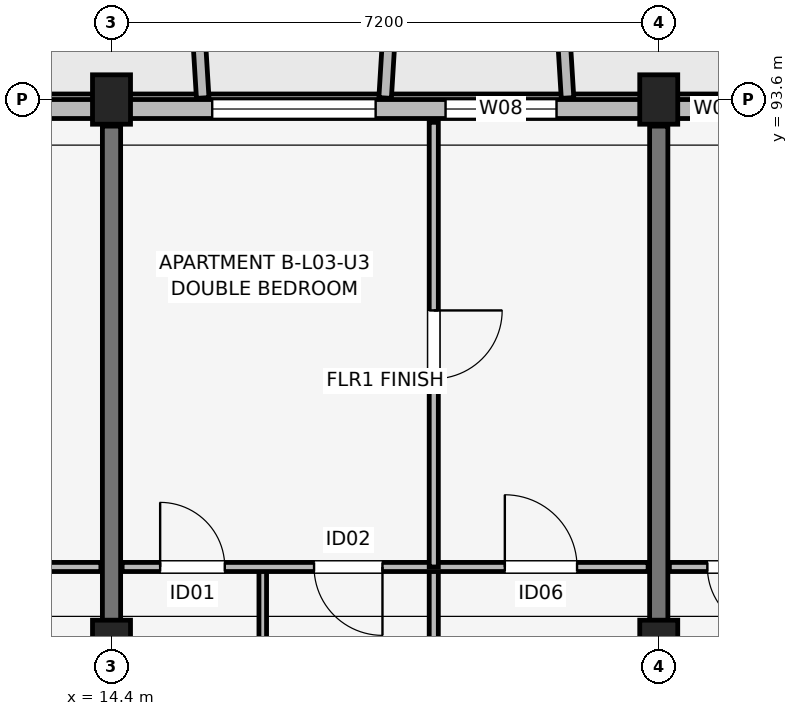
"""IFC4 building model, lengths in metres.
Left out: names, types, materials, properties, quantities, classifications, styles, units other than length and angle.
Written with IfcOpenShell. Run it as: python <this file> out.ifc"""

import sys

from ifc_helpers import new_model, si_unit, direction, frame, frame_2d, origin, origin_2d, place, context, subcontext, project, spatial, rectangle, extrude, element, fill, save


model = new_model("IFC4")
c1 = context("Model", 3, precision=1e-05, world=origin(), true_north=direction((0.0, 1.0)))
c2 = subcontext(c1, "Body", "Model", "MODEL_VIEW")
j1 = project(units=[si_unit("LENGTHUNIT", "METRE"), si_unit("PLANEANGLEUNIT", "RADIAN")], contexts=[c1])
p1 = place(None, origin())
s1 = spatial("IfcSite", under=j1, at=p1, CompositionType="ELEMENT")
p2 = place(p1, origin())
s2 = spatial("IfcBuilding", under=s1, at=p2, CompositionType="ELEMENT")
p3 = place(p2, frame((0.0, 0.0, 11.85)))
s3 = spatial("IfcBuildingStorey", under=s2, at=p3, CompositionType="ELEMENT", Elevation=11.85)
p4 = place(p3, frame((14.4, 86.4, 0.0), z_axis=(0.0, 0.0, 1.0), x_axis=(1.0, 0.0, 0.0)))
e1 = element("IfcColumn", 1, at=p4, inside=s3, PredefinedType="COLUMN", context=c2, shape_type="SweptSolid", body=[
    extrude(rectangle(XDim=0.5, YDim=0.7, at=origin_2d()), origin(), (0.0, 0.0, 1.0), 3.15),
])
p5 = place(p3, frame((14.4, 93.6, 0.0), z_axis=(0.0, 0.0, 1.0), x_axis=(1.0, 0.0, 0.0)))
e2 = element("IfcColumn", 2, at=p5, inside=s3, PredefinedType="COLUMN", context=c2, shape_type="SweptSolid", body=[
    extrude(rectangle(XDim=0.5, YDim=0.65, at=origin_2d()), origin(), (0.0, 0.0, 1.0), 3.15),
])
p6 = place(p3, frame((21.6, 86.4, 0.0), z_axis=(0.0, 0.0, 1.0), x_axis=(1.0, 0.0, 0.0)))
e3 = element("IfcColumn", 3, at=p6, inside=s3, PredefinedType="COLUMN", context=c2, shape_type="SweptSolid", body=[
    extrude(rectangle(XDim=0.5, YDim=0.7, at=origin_2d()), origin(), (0.0, 0.0, 1.0), 3.15),
])
p7 = place(p3, frame((21.6, 93.6, 0.0), z_axis=(0.0, 0.0, 1.0), x_axis=(1.0, 0.0, 0.0)))
e4 = element("IfcColumn", 4, at=p7, inside=s3, PredefinedType="COLUMN", context=c2, shape_type="SweptSolid", body=[
    extrude(rectangle(XDim=0.5, YDim=0.65, at=origin_2d()), origin(), (0.0, 0.0, 1.0), 3.15),
])
for number, where, z_axis, x_axis in (
    (5, (14.4, 83.85, 0.0), (0.0, 0.0, 1.0), (0.0, 1.0, 0.0)),
    (6, (21.6, 83.85, 0.0), (0.0, 0.0, 1.0), (0.0, 1.0, 0.0)),
):
    element("IfcWall", number, at=place(p3, frame(where, z_axis=z_axis, x_axis=x_axis)), inside=s3, PredefinedType="SHEAR", context=c2, shape_type="SweptSolid", body=[
        extrude(rectangle(XDim=9.4, YDim=0.24, at=frame_2d((4.7, 0.0))), origin(), (0.0, 0.0, 1.0), 3.15),
    ])
p8 = place(p3, frame((32.8, 93.475, 0.0), z_axis=(0.0, 0.0, 1.0), x_axis=(-1.0, 0.0, 0.0)))
e7 = element("IfcWall", 7, at=p8, inside=s3, PredefinedType="SOLIDWALL", context=c2, shape_type="SweptSolid", body=[
    extrude(rectangle(XDim=29.6, YDim=0.25, at=frame_2d((14.8, 0.0))), origin(), (0.0, 0.0, 1.0), 2.43),
])
p9 = place(p8, frame((21.7, 0.0, 0.0), z_axis=(0.0, 0.0, 1.0), x_axis=(-1.0, 0.0, 0.0)))
e8 = element("IfcOpeningElement", 8, at=p9, cuts=e7, PredefinedType="OPENING", context=c2, shape_type="SweptSolid", body=[
    extrude(rectangle(XDim=1.8, YDim=2.15, at=frame_2d((0.9, 1.075))), frame((0.0, 0.135, 0.0), z_axis=(0.0, -1.0, 0.0), x_axis=(1.0, 0.0, 0.0)), (0.0, 0.0, 1.0), 0.27),
])
p10 = place(p8, frame((7.225, 0.0, 0.0), z_axis=(0.0, 0.0, 1.0), x_axis=(-1.0, 0.0, 0.0)))
e9 = element("IfcOpeningElement", 9, at=p10, cuts=e7, PredefinedType="OPENING", context=c2, shape_type="SweptSolid", body=[
    extrude(rectangle(XDim=1.65, YDim=2.15, at=frame_2d((0.825, 1.075))), frame((0.0, 0.135, 0.0), z_axis=(0.0, -1.0, 0.0), x_axis=(1.0, 0.0, 0.0)), (0.0, 0.0, 1.0), 0.27),
])
p11 = place(p8, frame((26.925, 0.0, 0.67)))
e10 = element("IfcOpeningElement", 10, at=p11, cuts=e7, PredefinedType="OPENING", context=c2, shape_type="SweptSolid", body=[
    extrude(rectangle(XDim=2.15, YDim=1.65, at=frame_2d((1.075, 0.825))), frame((0.0, 0.135, 0.0), z_axis=(0.0, -1.0, 0.0), x_axis=(1.0, 0.0, 0.0)), (0.0, 0.0, 1.0), 0.27),
])
p12 = place(p8, frame((14.925, 0.0, 0.67)))
e11 = element("IfcOpeningElement", 11, at=p12, cuts=e7, PredefinedType="OPENING", context=c2, shape_type="SweptSolid", body=[
    extrude(rectangle(XDim=2.15, YDim=1.65, at=frame_2d((1.075, 0.825))), frame((0.0, 0.135, 0.0), z_axis=(0.0, -1.0, 0.0), x_axis=(1.0, 0.0, 0.0)), (0.0, 0.0, 1.0), 0.27),
])
p13 = place(p8, frame((12.545, 0.0, 0.75)))
e12 = element("IfcOpeningElement", 12, at=p13, cuts=e7, PredefinedType="OPENING", context=c2, shape_type="SweptSolid", body=[
    extrude(rectangle(XDim=1.46, YDim=1.55, at=frame_2d((0.73, 0.775))), frame((0.0, 0.135, 0.0), z_axis=(0.0, -1.0, 0.0), x_axis=(1.0, 0.0, 0.0)), (0.0, 0.0, 1.0), 0.27),
])
p14 = place(p8, frame((10.155, 0.0, 0.75)))
e13 = element("IfcOpeningElement", 13, at=p14, cuts=e7, PredefinedType="OPENING", context=c2, shape_type="SweptSolid", body=[
    extrude(rectangle(XDim=0.6, YDim=1.25, at=frame_2d((0.3, 0.625))), frame((0.0, 0.135, 0.0), z_axis=(0.0, -1.0, 0.0), x_axis=(1.0, 0.0, 0.0)), (0.0, 0.0, 1.0), 0.27),
])
p15 = place(p8, frame((2.955, 0.0, 0.75)))
e14 = element("IfcOpeningElement", 14, at=p15, cuts=e7, PredefinedType="OPENING", context=c2, shape_type="SweptSolid", body=[
    extrude(rectangle(XDim=0.6, YDim=1.25, at=frame_2d((0.3, 0.625))), frame((0.0, 0.135, 0.0), z_axis=(0.0, -1.0, 0.0), x_axis=(1.0, 0.0, 0.0)), (0.0, 0.0, 1.0), 0.27),
])
p16 = place(p8, frame((0.775, 0.0, 0.75)))
e15 = element("IfcOpeningElement", 15, at=p16, cuts=e7, PredefinedType="OPENING", context=c2, shape_type="SweptSolid", body=[
    extrude(rectangle(XDim=0.85, YDim=1.4, at=frame_2d((0.425, 0.7))), frame((0.0, 0.135, 0.0), z_axis=(0.0, -1.0, 0.0), x_axis=(1.0, 0.0, 0.0)), (0.0, 0.0, 1.0), 0.27),
])
for number, where, z_axis, x_axis in (
    (16, (15.6, 93.62, 0.0), (0.0, 0.0, 1.0), (-0.061, 0.998, 0.0)),
    (17, (18.0, 93.62, 0.0), (0.0, 0.0, 1.0), (0.061, 0.998, 0.0)),
    (18, (20.4, 93.62, 0.0), (0.0, 0.0, 1.0), (-0.061, 0.998, 0.0)),
):
    element("IfcWall", number, at=place(p3, frame(where, z_axis=z_axis, x_axis=x_axis)), inside=s3, PredefinedType="ELEMENTEDWALL", context=c2, shape_type="SweptSolid", body=[
        extrude(rectangle(XDim=1.964, YDim=0.165, at=frame_2d((0.982, 0.0))), origin(), (0.0, 0.0, 1.0), 2.45),
    ])
p17 = place(p3, frame((7.34, 87.45, 0.0), z_axis=(0.0, 0.0, 1.0), x_axis=(1.0, 0.0, 0.0)))
e19 = element("IfcWall", 19, at=p17, inside=s3, PredefinedType="PARTITIONING", context=c2, shape_type="SweptSolid", body=[
    extrude(rectangle(XDim=6.92, YDim=0.12, at=frame_2d((3.46, 0.0))), origin(), (0.0, 0.0, 1.0), 2.38),
])
p18 = place(p17, frame((0.5, 0.0, 0.0)))
e20 = element("IfcOpeningElement", 20, at=p18, cuts=e19, PredefinedType="OPENING", context=c2, shape_type="SweptSolid", body=[
    extrude(rectangle(XDim=0.85, YDim=2.08, at=frame_2d((0.425, 1.04))), frame((0.0, 0.07, 0.0), z_axis=(0.0, -1.0, 0.0), x_axis=(1.0, 0.0, 0.0)), (0.0, 0.0, 1.0), 0.14),
])
p19 = place(p17, frame((3.275, 0.0, 0.0), z_axis=(0.0, 0.0, 1.0), x_axis=(-1.0, 0.0, 0.0)))
e21 = element("IfcOpeningElement", 21, at=p19, cuts=e19, PredefinedType="OPENING", context=c2, shape_type="SweptSolid", body=[
    extrude(rectangle(XDim=0.9, YDim=2.08, at=frame_2d((0.45, 1.04))), frame((0.0, 0.07, 0.0), z_axis=(0.0, -1.0, 0.0), x_axis=(1.0, 0.0, 0.0)), (0.0, 0.0, 1.0), 0.14),
])
p20 = place(p17, frame((4.885, 0.0, 0.0)))
e22 = element("IfcOpeningElement", 22, at=p20, cuts=e19, PredefinedType="OPENING", context=c2, shape_type="SweptSolid", body=[
    extrude(rectangle(XDim=0.95, YDim=2.08, at=frame_2d((0.475, 1.04))), frame((0.0, 0.07, 0.0), z_axis=(0.0, -1.0, 0.0), x_axis=(1.0, 0.0, 0.0)), (0.0, 0.0, 1.0), 0.14),
])
p21 = place(p3, frame((16.39, 83.7, 0.0), z_axis=(0.0, 0.0, 1.0), x_axis=(0.0, 1.0, 0.0)))
e23 = element("IfcWall", 23, at=p21, inside=s3, PredefinedType="PARTITIONING", context=c2, shape_type="SweptSolid", body=[
    extrude(rectangle(XDim=3.75, YDim=0.1, at=frame_2d((1.875, 0.0))), origin(), (0.0, 0.0, 1.0), 2.375),
])
p22 = place(p3, frame((18.64, 83.7, 0.0), z_axis=(0.0, 0.0, 1.0), x_axis=(0.0, 1.0, 0.0)))
e24 = element("IfcWall", 24, at=p22, inside=s3, PredefinedType="PARTITIONING", context=c2, shape_type="SweptSolid", body=[
    extrude(rectangle(XDim=3.75, YDim=0.12, at=frame_2d((1.875, 0.0))), origin(), (0.0, 0.0, 1.0), 2.375),
])
p23 = place(p3, frame((14.54, 87.45, 0.0), z_axis=(0.0, 0.0, 1.0), x_axis=(1.0, 0.0, 0.0)))
e25 = element("IfcWall", 25, at=p23, inside=s3, PredefinedType="PARTITIONING", context=c2, shape_type="SweptSolid", body=[
    extrude(rectangle(XDim=6.92, YDim=0.12, at=frame_2d((3.46, 0.0))), origin(), (0.0, 0.0, 1.0), 2.38),
])
p24 = place(p23, frame((0.5, 0.0, 0.0)))
e26 = element("IfcOpeningElement", 26, at=p24, cuts=e25, PredefinedType="OPENING", context=c2, shape_type="SweptSolid", body=[
    extrude(rectangle(XDim=0.85, YDim=2.08, at=frame_2d((0.425, 1.04))), frame((0.0, 0.07, 0.0), z_axis=(0.0, -1.0, 0.0), x_axis=(1.0, 0.0, 0.0)), (0.0, 0.0, 1.0), 0.14),
])
p25 = place(p23, frame((3.425, 0.0, 0.0), z_axis=(0.0, 0.0, 1.0), x_axis=(-1.0, 0.0, 0.0)))
e27 = element("IfcOpeningElement", 27, at=p25, cuts=e25, PredefinedType="OPENING", context=c2, shape_type="SweptSolid", body=[
    extrude(rectangle(XDim=0.9, YDim=2.08, at=frame_2d((0.45, 1.04))), frame((0.0, 0.07, 0.0), z_axis=(0.0, -1.0, 0.0), x_axis=(1.0, 0.0, 0.0)), (0.0, 0.0, 1.0), 0.14),
])
p26 = place(p23, frame((5.035, 0.0, 0.0)))
e28 = element("IfcOpeningElement", 28, at=p26, cuts=e25, PredefinedType="OPENING", context=c2, shape_type="SweptSolid", body=[
    extrude(rectangle(XDim=0.95, YDim=2.08, at=frame_2d((0.475, 1.04))), frame((0.0, 0.07, 0.0), z_axis=(0.0, -1.0, 0.0), x_axis=(1.0, 0.0, 0.0)), (0.0, 0.0, 1.0), 0.14),
])
p27 = place(p3, frame((18.64, 87.45, 0.0), z_axis=(0.0, 0.0, 1.0), x_axis=(0.0, 1.0, 0.0)))
e29 = element("IfcWall", 29, at=p27, inside=s3, PredefinedType="PARTITIONING", context=c2, shape_type="SweptSolid", body=[
    extrude(rectangle(XDim=5.85, YDim=0.12, at=frame_2d((2.925, 0.0))), origin(), (0.0, 0.0, 1.0), 2.38),
])
p28 = place(p27, frame((3.375, 0.0, 0.0), z_axis=(0.0, 0.0, 1.0), x_axis=(-1.0, 0.0, 0.0)))
e30 = element("IfcOpeningElement", 30, at=p28, cuts=e29, PredefinedType="OPENING", context=c2, shape_type="SweptSolid", body=[
    extrude(rectangle(XDim=0.9, YDim=2.08, at=frame_2d((0.45, 1.04))), frame((0.0, 0.07, 0.0), z_axis=(0.0, -1.0, 0.0), x_axis=(1.0, 0.0, 0.0)), (0.0, 0.0, 1.0), 0.14),
])
p29 = place(p3, frame((21.74, 87.45, 0.0), z_axis=(0.0, 0.0, 1.0), x_axis=(1.0, 0.0, 0.0)))
e31 = element("IfcWall", 31, at=p29, inside=s3, PredefinedType="PARTITIONING", context=c2, shape_type="SweptSolid", body=[
    extrude(rectangle(XDim=6.92, YDim=0.12, at=frame_2d((3.46, 0.0))), origin(), (0.0, 0.0, 1.0), 2.38),
])
p30 = place(p29, frame((1.35, 0.0, 0.0), z_axis=(0.0, 0.0, 1.0), x_axis=(-1.0, 0.0, 0.0)))
e32 = element("IfcOpeningElement", 32, at=p30, cuts=e31, PredefinedType="OPENING", context=c2, shape_type="SweptSolid", body=[
    extrude(rectangle(XDim=0.85, YDim=2.08, at=frame_2d((0.425, 1.04))), frame((0.0, 0.07, 0.0), z_axis=(0.0, -1.0, 0.0), x_axis=(1.0, 0.0, 0.0)), (0.0, 0.0, 1.0), 0.14),
])
p31 = place(p29, frame((2.375, 0.0, 0.0)))
e33 = element("IfcOpeningElement", 33, at=p31, cuts=e31, PredefinedType="OPENING", context=c2, shape_type="SweptSolid", body=[
    extrude(rectangle(XDim=0.9, YDim=2.08, at=frame_2d((0.45, 1.04))), frame((0.0, 0.07, 0.0), z_axis=(0.0, -1.0, 0.0), x_axis=(1.0, 0.0, 0.0)), (0.0, 0.0, 1.0), 0.14),
])
p32 = place(p29, frame((5.835, 0.0, 0.0), z_axis=(0.0, 0.0, 1.0), x_axis=(-1.0, 0.0, 0.0)))
e34 = element("IfcOpeningElement", 34, at=p32, cuts=e31, PredefinedType="OPENING", context=c2, shape_type="SweptSolid", body=[
    extrude(rectangle(XDim=0.95, YDim=2.08, at=frame_2d((0.475, 1.04))), frame((0.0, 0.07, 0.0), z_axis=(0.0, -1.0, 0.0), x_axis=(1.0, 0.0, 0.0)), (0.0, 0.0, 1.0), 0.14),
])
p33 = place(p12, origin())
e35 = element("IfcWindow", 35, at=p33, inside=s3, PartitioningType="SINGLE_PANEL", PredefinedType="WINDOW", context=c2, shape_type="SweptSolid", body=[
    extrude(rectangle(XDim=2.15, YDim=1.65, at=frame_2d((1.075, 0.825))), frame((0.0, 0.03, 0.0), z_axis=(0.0, -1.0, 0.0), x_axis=(1.0, 0.0, 0.0)), (0.0, 0.0, 1.0), 0.06),
])
fill(e11, e35)
p34 = place(p13, origin())
e36 = element("IfcWindow", 36, at=p34, inside=s3, PartitioningType="SINGLE_PANEL", PredefinedType="WINDOW", context=c2, shape_type="SweptSolid", body=[
    extrude(rectangle(XDim=1.46, YDim=1.55, at=frame_2d((0.73, 0.775))), frame((0.0, 0.03, 0.0), z_axis=(0.0, -1.0, 0.0), x_axis=(1.0, 0.0, 0.0)), (0.0, 0.0, 1.0), 0.06),
])
fill(e12, e36)
p35 = place(p14, origin())
e37 = element("IfcWindow", 37, at=p35, inside=s3, PartitioningType="SINGLE_PANEL", PredefinedType="WINDOW", context=c2, shape_type="SweptSolid", body=[
    extrude(rectangle(XDim=0.6, YDim=1.25, at=frame_2d((0.3, 0.625))), frame((0.0, 0.03, 0.0), z_axis=(0.0, -1.0, 0.0), x_axis=(1.0, 0.0, 0.0)), (0.0, 0.0, 1.0), 0.06),
])
fill(e13, e37)
p36 = place(p24, origin())
e38 = element("IfcDoor", 38, at=p36, inside=s3, OperationType="SINGLE_SWING_LEFT", PredefinedType="DOOR", context=c2, shape_type="SweptSolid", body=[
    extrude(rectangle(XDim=0.85, YDim=2.08, at=frame_2d((0.425, 1.04))), frame((0.0, 0.025, 0.0), z_axis=(0.0, -1.0, 0.0), x_axis=(1.0, 0.0, 0.0)), (0.0, 0.0, 1.0), 0.05),
])
fill(e26, e38)
p37 = place(p25, origin())
e39 = element("IfcDoor", 39, at=p37, inside=s3, OperationType="SINGLE_SWING_RIGHT", PredefinedType="DOOR", context=c2, shape_type="SweptSolid", body=[
    extrude(rectangle(XDim=0.9, YDim=2.08, at=frame_2d((0.45, 1.04))), frame((0.0, 0.025, 0.0), z_axis=(0.0, -1.0, 0.0), x_axis=(1.0, 0.0, 0.0)), (0.0, 0.0, 1.0), 0.05),
])
fill(e27, e39)
p38 = place(p26, origin())
e40 = element("IfcDoor", 40, at=p38, inside=s3, OperationType="SINGLE_SWING_LEFT", PredefinedType="DOOR", context=c2, shape_type="SweptSolid", body=[
    extrude(rectangle(XDim=0.95, YDim=2.08, at=frame_2d((0.475, 1.04))), frame((0.0, 0.025, 0.0), z_axis=(0.0, -1.0, 0.0), x_axis=(1.0, 0.0, 0.0)), (0.0, 0.0, 1.0), 0.05),
])
fill(e28, e40)
p39 = place(p28, origin())
e41 = element("IfcDoor", 41, at=p39, inside=s3, OperationType="SINGLE_SWING_RIGHT", PredefinedType="DOOR", context=c2, shape_type="SweptSolid", body=[
    extrude(rectangle(XDim=0.9, YDim=2.08, at=frame_2d((0.45, 1.04))), frame((0.0, 0.025, 0.0), z_axis=(0.0, -1.0, 0.0), x_axis=(1.0, 0.0, 0.0)), (0.0, 0.0, 1.0), 0.05),
])
fill(e30, e41)
p40 = place(p30, origin())
e42 = element("IfcDoor", 42, at=p40, inside=s3, OperationType="SINGLE_SWING_RIGHT", PredefinedType="DOOR", context=c2, shape_type="SweptSolid", body=[
    extrude(rectangle(XDim=0.85, YDim=2.08, at=frame_2d((0.425, 1.04))), frame((0.0, 0.025, 0.0), z_axis=(0.0, -1.0, 0.0), x_axis=(1.0, 0.0, 0.0)), (0.0, 0.0, 1.0), 0.05),
])
fill(e32, e42)
save(model, sys.argv[1])
